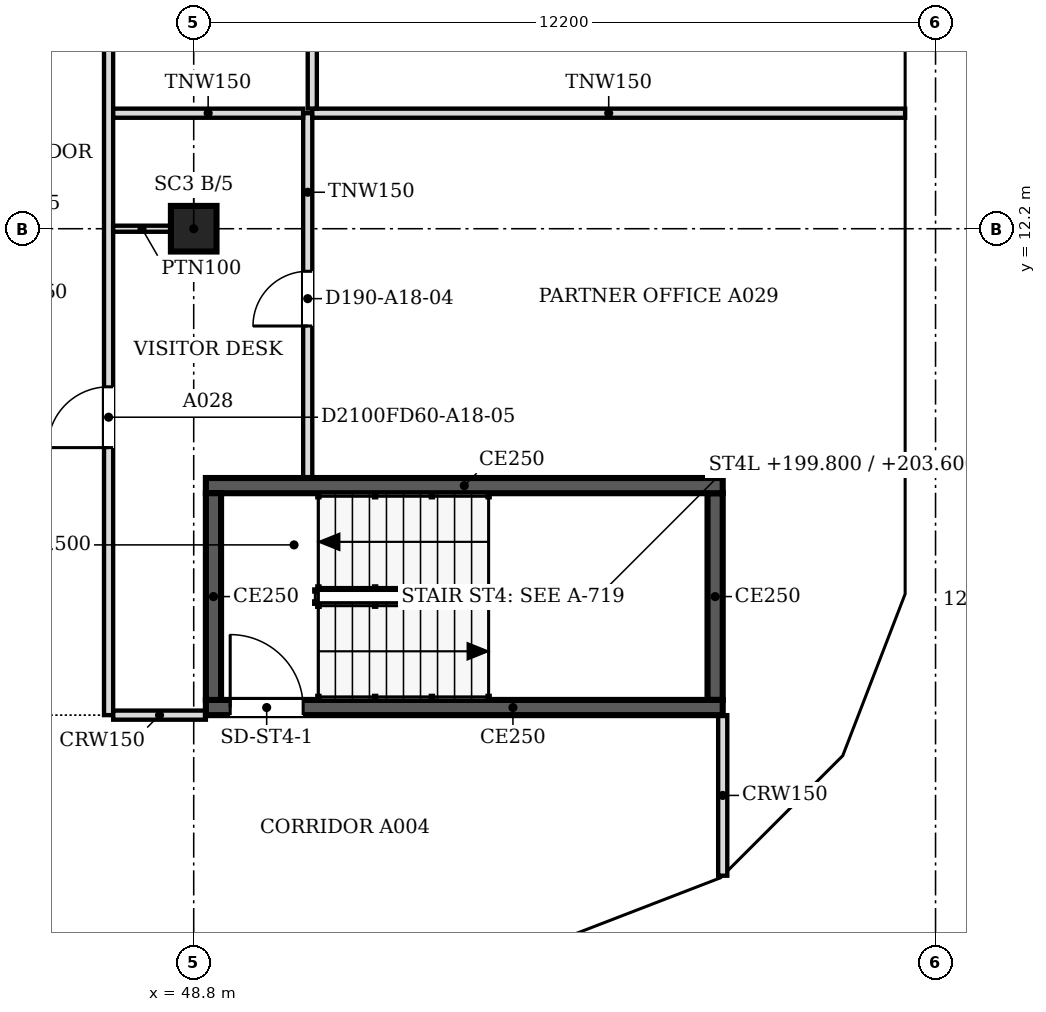
"""IFC4 building model, lengths in metres.
Left out: names, types, materials, properties, quantities, classifications, styles, units other than length and angle.
Written with IfcOpenShell. Run it as: python <this file> out.ifc"""

import sys

from ifc_helpers import new_model, si_unit, direction, frame, frame_2d, origin, origin_2d, place, context, subcontext, project, spatial, polyline, rectangle, outline, extrude, faceted_brep, source, transform, mapped, element, fill, save


model = new_model("IFC4")
c1 = context("Model", 3, precision=1e-05, world=origin(), true_north=direction((0.0, 1.0)))
c2 = subcontext(c1, "Body", "Model", "MODEL_VIEW")
j1 = project(units=[si_unit("LENGTHUNIT", "METRE"), si_unit("PLANEANGLEUNIT", "RADIAN")], contexts=[c1])
p1 = place(None, origin())
s1 = spatial("IfcSite", under=j1, at=p1, CompositionType="ELEMENT")
p2 = place(p1, origin())
s2 = spatial("IfcBuilding", under=s1, at=p2, CompositionType="ELEMENT")
p3 = place(p2, frame((0.0, 0.0, 197.9)))
s3 = spatial("IfcBuildingStorey", under=s2, at=p3, CompositionType="ELEMENT", Elevation=197.9)
p4 = place(p3, frame((48.8, 12.2, 0.0), z_axis=(0.0, 0.0, 1.0), x_axis=(1.0, 0.0, 0.0)))
e1 = element("IfcColumn", 1, at=p4, inside=s3, PredefinedType="COLUMN", context=c2, shape_type="SweptSolid", body=[
    extrude(rectangle(XDim=0.75, YDim=0.75, at=origin_2d()), origin(), (0.0, 0.0, 1.0), 3.6),
])
m1 = source(origin(), c2, "Body", "Brep", [
    faceted_brep([(2.997, -0.25, 0.0), (0.047, -0.25, 3.8), (0.0, -0.25, 3.741), (0.0, -0.25, 0.0), (0.093, 0.25, 3.74), (2.944, 0.25, 0.068), (2.944, 0.25, 0.0), (0.093, 0.25, 0.0), (0.047, 0.0, 3.8), (2.997, 0.0, 0.0)], [[[0, 1, 2, 3]], [[4, 5, 6, 7]], [[5, 4, 8, 1, 0, 9]], [[2, 1, 8]], [[7, 6, 9, 0, 3]], [[7, 3, 2, 8, 4]], [[9, 6, 5]]]),
])
p5 = place(p3, frame((54.81, 0.233, 0.0), z_axis=(0.0, 0.0, 1.0), x_axis=(0.932990326376, 0.359901446078, 0.0)))
e2 = element("IfcWall", 2, at=p5, inside=s3, PredefinedType="SOLIDWALL", context=c2, shape_type="MappedRepresentation", body=[
    mapped(m1, transform((0.0, 0.0, 0.0), scale=1.0)),
])
m2 = source(origin(), c2, "Body", "SweptSolid", [
    extrude(outline(polyline([(2.487, 0.25), (0.247, 3.135), (0.247, 0.25), (2.487, 0.25)])), frame((0.0, 0.26, 0.0), z_axis=(0.0, -1.0, 0.0), x_axis=(1.0, 0.0, 0.0)), (0.0, 0.0, 1.0), 0.52),
])
p6 = place(p5, origin())
e3 = element("IfcOpeningElement", 3, at=p6, cuts=e2, PredefinedType="OPENING", context=c2, shape_type="MappedRepresentation", body=[
    mapped(m2, transform((0.0, 0.0, 0.0), scale=1.0)),
])
m3 = source(origin(), c2, "Body", "Brep", [
    faceted_brep([(2.997, -0.25, 3.732), (2.944, -0.25, 3.8), (0.0, -0.25, 0.0), (2.997, -0.25, 0.0), (0.053, 0.25, 0.068), (2.891, 0.25, 3.732), (2.891, 0.25, 0.0), (0.053, 0.25, 0.0), (2.944, 0.0, 3.8), (0.0, 0.0, 0.0)], [[[0, 1, 2, 3]], [[4, 5, 6, 7]], [[8, 1, 0]], [[5, 4, 9, 2, 1, 8]], [[7, 6, 3, 2, 9]], [[7, 9, 4]], [[3, 6, 5, 8, 0]]]),
])
p7 = place(p3, frame((57.606, 1.312, 0.0), z_axis=(0.0, 0.0, 1.0), x_axis=(0.707147509625, 0.707066050402, 0.0)))
e4 = element("IfcWall", 4, at=p7, inside=s3, PredefinedType="SOLIDWALL", context=c2, shape_type="MappedRepresentation", body=[
    mapped(m3, transform((0.0, 0.0, 0.0), scale=1.0)),
])
m4 = source(origin(), c2, "Body", "SweptSolid", [
    extrude(outline(polyline([(2.744, 3.134), (0.51, 0.25), (2.744, 0.25), (2.744, 3.134)])), frame((0.0, 0.26, 0.0), z_axis=(0.0, -1.0, 0.0), x_axis=(1.0, 0.0, 0.0)), (0.0, 0.0, 1.0), 0.52),
])
p8 = place(p7, origin())
e5 = element("IfcOpeningElement", 5, at=p8, cuts=e4, PredefinedType="OPENING", context=c2, shape_type="MappedRepresentation", body=[
    mapped(m4, transform((0.0, 0.0, 0.0), scale=1.0)),
])
m5 = source(origin(), c2, "Body", "Brep", [
    faceted_brep([(3.003, -0.25, 0.0), (0.053, -0.25, 3.8), (0.0, -0.25, 3.732), (0.0, -0.25, 0.0), (0.106, 0.25, 3.732), (2.957, 0.25, 0.06), (2.957, 0.25, 0.0), (0.106, 0.25, 0.0), (0.053, 0.0, 3.8), (3.003, 0.0, 0.0)], [[[0, 1, 2, 3]], [[4, 5, 6, 7]], [[5, 4, 8, 1, 0, 9]], [[2, 1, 8]], [[7, 6, 9, 0, 3]], [[7, 3, 2, 8, 4]], [[9, 6, 5]]]),
])
p9 = place(p3, frame((59.669, 3.344, 0.0), z_axis=(0.0, 0.0, 1.0), x_axis=(0.35992665181, 0.932980602862, 0.0)))
e6 = element("IfcWall", 6, at=p9, inside=s3, PredefinedType="SOLIDWALL", context=c2, shape_type="MappedRepresentation", body=[
    mapped(m5, transform((0.0, 0.0, 0.0), scale=1.0)),
])
m6 = source(origin(), c2, "Body", "SweptSolid", [
    extrude(outline(polyline([(2.493, 0.25), (0.253, 3.135), (0.253, 0.25), (2.493, 0.25)])), frame((0.0, 0.26, 0.0), z_axis=(0.0, -1.0, 0.0), x_axis=(1.0, 0.0, 0.0)), (0.0, 0.0, 1.0), 0.52),
])
p10 = place(p9, origin())
e7 = element("IfcOpeningElement", 7, at=p10, cuts=e6, PredefinedType="OPENING", context=c2, shape_type="MappedRepresentation", body=[
    mapped(m6, transform((0.0, 0.0, 0.0), scale=1.0)),
])
m7 = source(origin(), c2, "Body", "Brep", [
    faceted_brep([(6.053, -0.25, 0.0), (3.003, -0.25, 3.8), (0.0, -0.25, 0.0), (0.047, 0.25, 0.059), (3.003, 0.25, 3.8), (6.053, 0.25, 0.0), (0.047, 0.25, 0.0), (0.0, 0.0, 0.0)], [[[0, 1, 2]], [[3, 4, 5, 6]], [[5, 4, 1, 0]], [[4, 3, 7, 2, 1]], [[6, 5, 0, 2, 7]], [[6, 7, 3]]]),
])
p11 = place(p3, frame((60.75, 6.146, 0.0), z_axis=(0.0, 0.0, 1.0), x_axis=(0.0, 1.0, 0.0)))
e8 = element("IfcWall", 8, at=p11, inside=s3, PredefinedType="SOLIDWALL", context=c2, shape_type="MappedRepresentation", body=[
    mapped(m7, transform((0.0, 0.0, 0.0), scale=1.0)),
])
m8 = source(origin(), c2, "Body", "SweptSolid", [
    extrude(outline(polyline([(5.532, 0.25), (3.005, 3.399), (0.516, 0.25), (5.532, 0.25)])), frame((0.0, 0.26, 0.0), z_axis=(0.0, -1.0, 0.0), x_axis=(1.0, 0.0, 0.0)), (0.0, 0.0, 1.0), 0.52),
])
p12 = place(p11, origin())
e9 = element("IfcOpeningElement", 9, at=p12, cuts=e8, PredefinedType="OPENING", context=c2, shape_type="MappedRepresentation", body=[
    mapped(m8, transform((0.0, 0.0, 0.0), scale=1.0)),
])
m9 = source(origin(), c2, "Body", "SweptSolid", [
    extrude(outline(polyline([(6.1, 0.0), (3.05, 3.8), (0.0, 0.0), (6.1, 0.0)])), frame((0.0, 0.25, 0.0), z_axis=(0.0, -1.0, 0.0), x_axis=(1.0, 0.0, 0.0)), (0.0, 0.0, 1.0), 0.5),
])
p13 = place(p3, frame((60.75, 12.2, 0.0), z_axis=(0.0, 0.0, 1.0), x_axis=(0.0, 1.0, 0.0)))
e10 = element("IfcWall", 10, at=p13, inside=s3, PredefinedType="SOLIDWALL", context=c2, shape_type="MappedRepresentation", body=[
    mapped(m9, transform((0.0, 0.0, 0.0), scale=1.0)),
])
m10 = source(origin(), c2, "Body", "SweptSolid", [
    extrude(outline(polyline([(5.579, 0.25), (3.05, 3.401), (0.521, 0.25), (5.579, 0.25)])), frame((0.0, 0.26, 0.0), z_axis=(0.0, -1.0, 0.0), x_axis=(1.0, 0.0, 0.0)), (0.0, 0.0, 1.0), 0.52),
])
p14 = place(p13, origin())
e11 = element("IfcOpeningElement", 11, at=p14, cuts=e10, PredefinedType="OPENING", context=c2, shape_type="MappedRepresentation", body=[
    mapped(m10, transform((0.0, 0.0, 0.0), scale=1.0)),
])
p15 = place(p2, frame((0.0, 0.0, 201.7)))
s4 = spatial("IfcBuildingStorey", under=s2, at=p15, CompositionType="ELEMENT", Elevation=201.7)
m11 = source(origin(), c2, "Body", "Brep", [
    faceted_brep([(2.95, -0.25, 0.0), (3.003, -0.25, 0.068), (3.003, -0.25, 7.532), (2.95, -0.25, 7.6), (0.0, -0.25, 3.8), (0.047, 0.25, 3.86), (2.898, 0.25, 7.532), (2.898, 0.25, 0.068), (0.047, 0.25, 3.74), (2.95, 0.0, 0.0), (2.95, 0.0, 7.6), (0.0, 0.0, 3.8)], [[[0, 1, 2, 3, 4]], [[5, 6, 7, 8]], [[1, 0, 9]], [[10, 3, 2]], [[6, 5, 11, 4, 3, 10]], [[8, 7, 9, 0, 4, 11]], [[8, 11, 5]], [[1, 9, 7, 6, 10, 2]]]),
])
p16 = place(p15, frame((54.854, 0.25, -3.8), z_axis=(0.0, 0.0, 1.0), x_axis=(0.932970071518, 0.359953949349, 0.0)))
e12 = element("IfcWall", 12, at=p16, inside=s4, PredefinedType="SOLIDWALL", context=c2, shape_type="MappedRepresentation", body=[
    mapped(m11, transform((0.0, 0.0, 0.0), scale=1.0)),
])
m12 = source(origin(), c2, "Body", "SweptSolid", [
    extrude(outline(polyline([(2.75, 6.935), (0.316, 3.8), (2.75, 0.665), (2.75, 6.935)])), frame((0.0, 0.26, 0.0), z_axis=(0.0, -1.0, 0.0), x_axis=(1.0, 0.0, 0.0)), (0.0, 0.0, 1.0), 0.52),
])
p17 = place(p16, origin())
e13 = element("IfcOpeningElement", 13, at=p17, cuts=e12, PredefinedType="OPENING", context=c2, shape_type="MappedRepresentation", body=[
    mapped(m12, transform((0.0, 0.0, 0.0), scale=1.0)),
])
m13 = source(origin(), c2, "Body", "Brep", [
    faceted_brep([(0.053, -0.25, 0.0), (2.997, -0.25, 3.8), (0.053, -0.25, 7.6), (0.0, -0.25, 7.532), (0.0, -0.25, 0.068), (0.106, 0.25, 7.532), (2.944, 0.25, 3.868), (2.944, 0.25, 3.732), (0.106, 0.25, 0.068), (2.997, 0.0, 3.8), (0.053, 0.0, 0.0), (0.053, 0.0, 7.6)], [[[0, 1, 2, 3, 4]], [[5, 6, 7, 8]], [[8, 7, 9, 1, 0, 10]], [[6, 5, 11, 2, 1, 9]], [[3, 2, 11]], [[10, 0, 4]], [[8, 10, 4, 3, 11, 5]], [[9, 7, 6]]]),
])
p18 = place(p15, frame((57.569, 1.274, -3.8), z_axis=(0.0, 0.0, 1.0), x_axis=(0.707066050402, 0.707147509625, 0.0)))
e14 = element("IfcWall", 14, at=p18, inside=s4, PredefinedType="SOLIDWALL", context=c2, shape_type="MappedRepresentation", body=[
    mapped(m13, transform((0.0, 0.0, 0.0), scale=1.0)),
])
m14 = source(origin(), c2, "Body", "SweptSolid", [
    extrude(outline(polyline([(0.253, 0.667), (2.681, 3.8), (0.253, 6.934), (0.253, 0.667)])), frame((0.0, 0.26, 0.0), z_axis=(0.0, -1.0, 0.0), x_axis=(1.0, 0.0, 0.0)), (0.0, 0.0, 1.0), 0.52),
])
p19 = place(p18, origin())
e15 = element("IfcOpeningElement", 15, at=p19, cuts=e14, PredefinedType="OPENING", context=c2, shape_type="MappedRepresentation", body=[
    mapped(m14, transform((0.0, 0.0, 0.0), scale=1.0)),
])
m15 = source(origin(), c2, "Body", "Brep", [
    faceted_brep([(2.95, -0.25, 0.0), (2.997, -0.25, 0.059), (2.997, -0.25, 7.541), (2.95, -0.25, 7.6), (0.0, -0.25, 3.8), (0.053, 0.25, 3.868), (2.904, 0.25, 7.54), (2.904, 0.25, 0.06), (0.053, 0.25, 3.732), (2.95, 0.0, 0.0), (2.95, 0.0, 7.6), (0.0, 0.0, 3.8)], [[[0, 1, 2, 3, 4]], [[5, 6, 7, 8]], [[1, 0, 9]], [[10, 3, 2]], [[6, 5, 11, 4, 3, 10]], [[8, 7, 9, 0, 4, 11]], [[8, 11, 5]], [[1, 9, 7, 6, 10, 2]]]),
])
p20 = place(p15, frame((59.688, 3.394, -3.8), z_axis=(0.0, 0.0, 1.0), x_axis=(0.359972353723, 0.932962970624, 0.0)))
e16 = element("IfcWall", 16, at=p20, inside=s4, PredefinedType="SOLIDWALL", context=c2, shape_type="MappedRepresentation", body=[
    mapped(m15, transform((0.0, 0.0, 0.0), scale=1.0)),
])
p21 = place(p20, origin())
e17 = element("IfcOpeningElement", 17, at=p21, cuts=e16, PredefinedType="OPENING", context=c2, shape_type="MappedRepresentation", body=[
    mapped(m12, transform((0.0, 0.0, 0.0), scale=1.0)),
])
m16 = source(origin(), c2, "Body", "Brep", [
    faceted_brep([(0.047, -0.25, 0.0), (3.05, -0.25, 3.8), (0.047, -0.25, 7.6), (0.0, -0.25, 7.54), (0.0, -0.25, 0.06), (0.093, 0.25, 7.541), (3.05, 0.25, 3.8), (0.093, 0.25, 0.059), (0.047, 0.0, 0.0), (0.047, 0.0, 7.6)], [[[0, 1, 2, 3, 4]], [[5, 6, 7]], [[7, 6, 1, 0, 8]], [[6, 5, 9, 2, 1]], [[3, 2, 9]], [[8, 0, 4]], [[7, 8, 4, 3, 9, 5]]]),
])
p22 = place(p15, frame((60.75, 6.1, -3.8), z_axis=(0.0, 0.0, 1.0), x_axis=(0.0, 1.0, 0.0)))
e18 = element("IfcWall", 18, at=p22, inside=s4, PredefinedType="SOLIDWALL", context=c2, shape_type="MappedRepresentation", body=[
    mapped(m16, transform((0.0, 0.0, 0.0), scale=1.0)),
])
m17 = source(origin(), c2, "Body", "SweptSolid", [
    extrude(outline(polyline([(0.247, 0.656), (2.731, 3.8), (0.247, 6.944), (0.247, 0.656)])), frame((0.0, 0.26, 0.0), z_axis=(0.0, -1.0, 0.0), x_axis=(1.0, 0.0, 0.0)), (0.0, 0.0, 1.0), 0.52),
])
p23 = place(p22, origin())
e19 = element("IfcOpeningElement", 19, at=p23, cuts=e18, PredefinedType="OPENING", context=c2, shape_type="MappedRepresentation", body=[
    mapped(m17, transform((0.0, 0.0, 0.0), scale=1.0)),
])
m18 = source(origin(), c2, "Body", "SweptSolid", [
    extrude(outline(polyline([(3.05, 0.0), (6.1, 3.8), (3.05, 7.6), (0.0, 3.8), (3.05, 0.0)])), frame((0.0, 0.25, 0.0), z_axis=(0.0, -1.0, 0.0), x_axis=(1.0, 0.0, 0.0)), (0.0, 0.0, 1.0), 0.5),
])
p24 = place(p15, frame((60.75, 9.15, -3.8), z_axis=(0.0, 0.0, 1.0), x_axis=(0.0, 1.0, 0.0)))
e20 = element("IfcWall", 20, at=p24, inside=s4, PredefinedType="SOLIDWALL", context=c2, shape_type="MappedRepresentation", body=[
    mapped(m18, transform((0.0, 0.0, 0.0), scale=1.0)),
])
m19 = source(origin(), c2, "Body", "SweptSolid", [
    extrude(outline(polyline([(3.05, 0.399), (5.78, 3.8), (3.05, 7.201), (0.321, 3.8), (3.05, 0.399)])), frame((0.0, 0.26, 0.0), z_axis=(0.0, -1.0, 0.0), x_axis=(1.0, 0.0, 0.0)), (0.0, 0.0, 1.0), 0.52),
])
p25 = place(p24, origin())
e21 = element("IfcOpeningElement", 21, at=p25, cuts=e20, PredefinedType="OPENING", context=c2, shape_type="MappedRepresentation", body=[
    mapped(m19, transform((0.0, 0.0, 0.0), scale=1.0)),
])
p26 = place(p3, frame((57.5, 4.325, 0.0), z_axis=(0.0, 0.0, 1.0), x_axis=(-1.0, 0.0, 0.0)))
e22 = element("IfcWall", 22, at=p26, inside=s3, PredefinedType="SOLIDWALL", context=c2, shape_type="SweptSolid", body=[
    extrude(rectangle(XDim=8.5, YDim=0.25, at=frame_2d((4.25, 0.0))), origin(), (0.0, 0.0, 1.0), 3.8),
])
m20 = source(origin(), c2, "Body", "SweptSolid", [
    extrude(rectangle(XDim=1.2, YDim=2.1, at=frame_2d((0.6, 1.05))), frame((0.0, 0.135, 0.0), z_axis=(0.0, -1.0, 0.0), x_axis=(1.0, 0.0, 0.0)), (0.0, 0.0, 1.0), 0.27),
])
p27 = place(p26, frame((6.9, 0.0, 0.0)))
e23 = element("IfcOpeningElement", 23, at=p27, cuts=e22, PredefinedType="OPENING", context=c2, shape_type="MappedRepresentation", body=[
    mapped(m20, transform((0.0, 0.0, 0.0), scale=1.0)),
])
p28 = place(p3, frame((49.125, 4.45, 0.0), z_axis=(0.0, 0.0, 1.0), x_axis=(0.0, 1.0, 0.0)))
e24 = element("IfcWall", 24, at=p28, inside=s3, PredefinedType="SOLIDWALL", context=c2, shape_type="SweptSolid", body=[
    extrude(rectangle(XDim=3.4, YDim=0.25, at=frame_2d((1.7, 0.0))), origin(), (0.0, 0.0, 1.0), 3.8),
])
p29 = place(p3, frame((49.0, 7.975, 0.0), z_axis=(0.0, 0.0, 1.0), x_axis=(1.0, 0.0, 0.0)))
e25 = element("IfcWall", 25, at=p29, inside=s3, PredefinedType="SOLIDWALL", context=c2, shape_type="SweptSolid", body=[
    extrude(rectangle(XDim=8.5, YDim=0.25, at=frame_2d((4.25, 0.0))), origin(), (0.0, 0.0, 1.0), 3.8),
])
p30 = place(p3, frame((57.375, 7.85, 0.0), z_axis=(0.0, 0.0, 1.0), x_axis=(0.0, -1.0, 0.0)))
e26 = element("IfcWall", 26, at=p30, inside=s3, PredefinedType="SOLIDWALL", context=c2, shape_type="SweptSolid", body=[
    extrude(rectangle(XDim=3.4, YDim=0.25, at=frame_2d((1.7, 0.0))), origin(), (0.0, 0.0, 1.0), 3.8),
])
p31 = place(p3, frame((57.5, 1.559, 0.0), z_axis=(0.0, 0.0, 1.0), x_axis=(0.0, 1.0, 0.0)))
e27 = element("IfcWall", 27, at=p31, inside=s3, PredefinedType="PARTITIONING", context=c2, shape_type="SweptSolid", body=[
    extrude(rectangle(XDim=2.641, YDim=0.15, at=frame_2d((1.32, 0.0))), origin(), (0.0, 0.0, 1.0), 3.067),
])
p32 = place(p3, frame((47.4, 22.3, 0.0), z_axis=(0.0, 0.0, 1.0), x_axis=(0.0, -1.0, 0.0)))
e28 = element("IfcWall", 28, at=p32, inside=s3, PredefinedType="PARTITIONING", context=c2, shape_type="SweptSolid", body=[
    extrude(rectangle(XDim=18.1, YDim=0.15, at=frame_2d((9.05, 0.0))), origin(), (0.0, 0.0, 1.0), 3.067),
])
m21 = source(origin(), c2, "Body", "SweptSolid", [
    extrude(rectangle(XDim=1.0, YDim=2.1, at=frame_2d((0.5, 1.05))), frame((0.0, 0.085, 0.0), z_axis=(0.0, -1.0, 0.0), x_axis=(1.0, 0.0, 0.0)), (0.0, 0.0, 1.0), 0.17),
])
p33 = place(p32, frame((3.599, 0.0, 0.0)))
e29 = element("IfcOpeningElement", 29, at=p33, cuts=e28, PredefinedType="OPENING", context=c2, shape_type="MappedRepresentation", body=[
    mapped(m21, transform((0.0, 0.0, 0.0), scale=1.0)),
])
p34 = place(p32, frame((12.7, 0.0, 0.0)))
e30 = element("IfcOpeningElement", 30, at=p34, cuts=e28, PredefinedType="OPENING", context=c2, shape_type="MappedRepresentation", body=[
    mapped(m21, transform((0.0, 0.0, 0.0), scale=1.0)),
])
p35 = place(p3, frame((47.476, 4.2, 0.0), z_axis=(0.0, 0.0, 1.0), x_axis=(1.0, 0.0, 0.0)))
e31 = element("IfcWall", 31, at=p35, inside=s3, PredefinedType="PARTITIONING", context=c2, shape_type="SweptSolid", body=[
    extrude(rectangle(XDim=1.524, YDim=0.15, at=frame_2d((0.762, 0.0))), origin(), (0.0, 0.0, 1.0), 3.067),
])
p36 = place(p3, frame((50.675, 14.1, 0.0), z_axis=(0.0, 0.0, 1.0), x_axis=(0.0, -1.0, 0.0)))
e32 = element("IfcWall", 32, at=p36, inside=s3, PredefinedType="PARTITIONING", context=c2, shape_type="SweptSolid", body=[
    extrude(rectangle(XDim=6.0, YDim=0.15, at=frame_2d((3.0, 0.0))), origin(), (0.0, 0.0, 1.0), 3.067),
])
m22 = source(origin(), c2, "Body", "SweptSolid", [
    extrude(rectangle(XDim=0.9, YDim=2.1, at=frame_2d((0.45, 1.05))), frame((0.0, 0.085, 0.0), z_axis=(0.0, -1.0, 0.0), x_axis=(1.0, 0.0, 0.0)), (0.0, 0.0, 1.0), 0.17),
])
p37 = place(p36, frame((2.6, 0.0, 0.0)))
e33 = element("IfcOpeningElement", 33, at=p37, cuts=e32, PredefinedType="OPENING", context=c2, shape_type="MappedRepresentation", body=[
    mapped(m22, transform((0.0, 0.0, 0.0), scale=1.0)),
])
p38 = place(p3, frame((48.425, 12.2, 0.0), z_axis=(0.0, 0.0, 1.0), x_axis=(-1.0, 0.0, 0.0)))
e34 = element("IfcWall", 34, at=p38, inside=s3, PredefinedType="PARTITIONING", context=c2, shape_type="SweptSolid", body=[
    extrude(rectangle(XDim=0.95, YDim=0.1, at=frame_2d((0.475, 0.0))), origin(), (0.0, 0.0, 1.0), 3.067),
])
p39 = place(p3, frame((47.476, 14.1, 0.0), z_axis=(0.0, 0.0, 1.0), x_axis=(1.0, 0.0, 0.0)))
e35 = element("IfcWall", 35, at=p39, inside=s3, PredefinedType="PARTITIONING", context=c2, shape_type="SweptSolid", body=[
    extrude(rectangle(XDim=3.123, YDim=0.15, at=frame_2d((1.562, 0.0))), origin(), (0.0, 0.0, 1.0), 3.067),
])
p40 = place(p3, frame((50.75, 14.1, 0.0), z_axis=(0.0, 0.0, 1.0), x_axis=(1.0, 0.0, 0.0)))
e36 = element("IfcWall", 36, at=p40, inside=s3, PredefinedType="PARTITIONING", context=c2, shape_type="SweptSolid", body=[
    extrude(rectangle(XDim=9.75, YDim=0.15, at=frame_2d((4.875, 0.0))), origin(), (0.0, 0.0, 1.0), 3.067),
])
p41 = place(p3, frame((50.75, 22.224, 0.0), z_axis=(0.0, 0.0, 1.0), x_axis=(0.0, -1.0, 0.0)))
e37 = element("IfcWall", 37, at=p41, inside=s3, PredefinedType="PARTITIONING", context=c2, shape_type="SweptSolid", body=[
    extrude(rectangle(XDim=8.048, YDim=0.15, at=frame_2d((4.024, 0.0))), origin(), (0.0, 0.0, 1.0), 3.067),
])
p42 = place(p41, frame((5.648, 0.0, 0.0)))
e38 = element("IfcOpeningElement", 38, at=p42, cuts=e37, PredefinedType="OPENING", context=c2, shape_type="MappedRepresentation", body=[
    mapped(m22, transform((0.0, 0.0, 0.0), scale=1.0)),
])
p43 = place(p41, frame((1.663, 0.0, 0.0)))
e39 = element("IfcOpeningElement", 39, at=p43, cuts=e37, PredefinedType="OPENING", context=c2, shape_type="MappedRepresentation", body=[
    mapped(m22, transform((0.0, 0.0, 0.0), scale=1.0)),
])
m23 = source(origin(), c2, "Body", "SweptSolid", [
    extrude(rectangle(XDim=1.2, YDim=2.1, at=frame_2d((0.6, 1.05))), frame((0.0, 0.025, 0.0), z_axis=(0.0, -1.0, 0.0), x_axis=(1.0, 0.0, 0.0)), (0.0, 0.0, 1.0), 0.05),
])
p44 = place(p27, origin())
e40 = element("IfcDoor", 40, at=p44, inside=s3, OperationType="SINGLE_SWING_RIGHT", PredefinedType="DOOR", context=c2, shape_type="MappedRepresentation", body=[
    mapped(m23, transform((0.0, 0.0, 0.0), scale=1.0)),
])
fill(e23, e40)
m24 = source(origin(), c2, "Body", "SweptSolid", [
    extrude(rectangle(XDim=0.9, YDim=2.1, at=frame_2d((0.45, 1.05))), frame((0.0, 0.025, 0.0), z_axis=(0.0, -1.0, 0.0), x_axis=(1.0, 0.0, 0.0)), (0.0, 0.0, 1.0), 0.05),
])
p45 = place(p37, origin())
e41 = element("IfcDoor", 41, at=p45, inside=s3, OperationType="SINGLE_SWING_RIGHT", PredefinedType="DOOR", context=c2, shape_type="MappedRepresentation", body=[
    mapped(m24, transform((0.0, 0.0, 0.0), scale=1.0)),
])
fill(e33, e41)
m25 = source(origin(), c2, "Body", "SweptSolid", [
    extrude(rectangle(XDim=1.0, YDim=2.1, at=frame_2d((0.5, 1.05))), frame((0.0, 0.025, 0.0), z_axis=(0.0, -1.0, 0.0), x_axis=(1.0, 0.0, 0.0)), (0.0, 0.0, 1.0), 0.05),
])
p46 = place(p34, origin())
e42 = element("IfcDoor", 42, at=p46, inside=s3, OperationType="SINGLE_SWING_RIGHT", PredefinedType="DOOR", context=c2, shape_type="MappedRepresentation", body=[
    mapped(m25, transform((0.0, 0.0, 0.0), scale=1.0)),
])
fill(e30, e42)
save(model, sys.argv[1])
